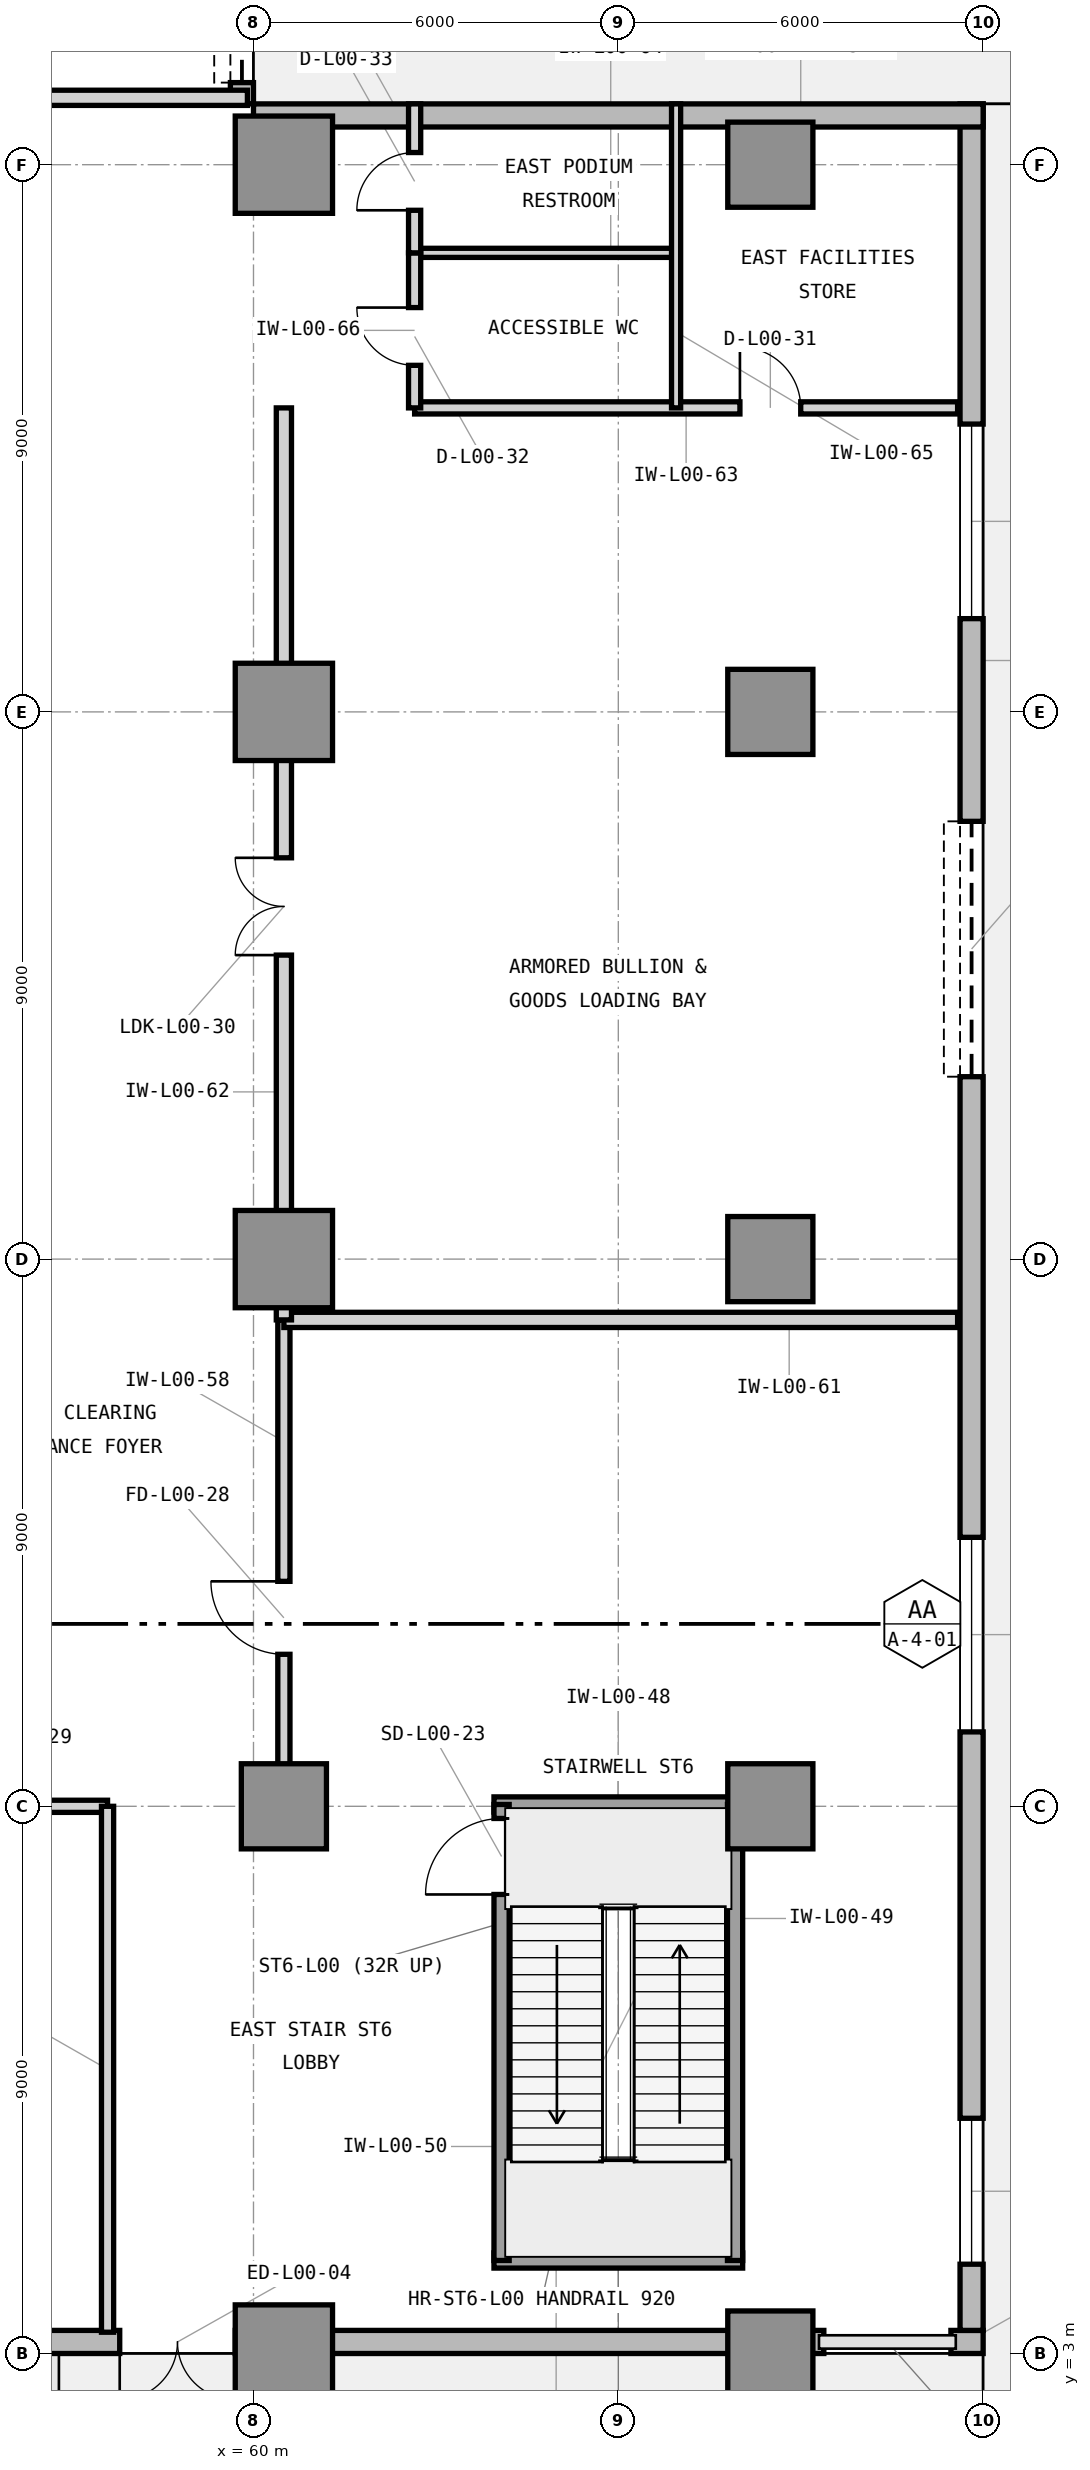
"""IFC4 building model, lengths in metres.
Left out: names, types, materials, properties, quantities, classifications, styles, units other than length and angle.
Written with IfcOpenShell. Run it as: python <this file> out.ifc"""

import sys

from ifc_helpers import new_model, si_unit, direction, frame, frame_2d, origin, origin_2d, place, context, subcontext, project, spatial, rectangle, extrude, element, fill, save


model = new_model("IFC4")
c1 = context("Model", 3, precision=1e-05, world=origin(), true_north=direction((0.0, 1.0)))
c2 = subcontext(c1, "Body", "Model", "MODEL_VIEW")
j1 = project(units=[si_unit("LENGTHUNIT", "METRE"), si_unit("PLANEANGLEUNIT", "RADIAN")], contexts=[c1])
p1 = place(None, origin())
s1 = spatial("IfcSite", under=j1, at=p1, CompositionType="ELEMENT")
p2 = place(p1, origin())
s2 = spatial("IfcBuilding", under=s1, at=p2, CompositionType="ELEMENT")
p3 = place(p2, origin())
s3 = spatial("IfcBuildingStorey", under=s2, at=p3, CompositionType="ELEMENT", Elevation=0.0)
p4 = place(p3, frame((60.5, 3.0, 0.0), z_axis=(0.0, 0.0, 1.0), x_axis=(1.0, 0.0, 0.0)))
e1 = element("IfcColumn", 1, at=p4, inside=s3, PredefinedType="COLUMN", context=c2, shape_type="SweptSolid", body=[
    extrude(rectangle(XDim=1.6, YDim=1.6, at=origin_2d()), origin(), (0.0, 0.0, 1.0), 5.4),
])
p5 = place(p3, frame((60.5, 12.0, 0.0), z_axis=(0.0, 0.0, 1.0), x_axis=(1.0, 0.0, 0.0)))
e2 = element("IfcColumn", 2, at=p5, inside=s3, PredefinedType="COLUMN", context=c2, shape_type="SweptSolid", body=[
    extrude(rectangle(XDim=1.4, YDim=1.4, at=origin_2d()), origin(), (0.0, 0.0, 1.0), 5.4),
])
for number, where, z_axis, x_axis in (
    (3, (60.5, 21.0, 0.0), (0.0, 0.0, 1.0), (1.0, 0.0, 0.0)),
    (4, (60.5, 30.0, 0.0), (0.0, 0.0, 1.0), (1.0, 0.0, 0.0)),
    (5, (60.5, 39.0, 0.0), (0.0, 0.0, 1.0), (1.0, 0.0, 0.0)),
):
    element("IfcColumn", number, at=place(p3, frame(where, z_axis=z_axis, x_axis=x_axis)), inside=s3, PredefinedType="COLUMN", context=c2, shape_type="SweptSolid", body=[
        extrude(rectangle(XDim=1.6, YDim=1.6, at=origin_2d()), origin(), (0.0, 0.0, 1.0), 5.4),
    ])
for number, where, z_axis, x_axis in (
    (6, (68.5, 3.0, 0.0), (0.0, 0.0, 1.0), (1.0, 0.0, 0.0)),
    (7, (68.5, 12.0, 0.0), (0.0, 0.0, 1.0), (1.0, 0.0, 0.0)),
    (8, (68.5, 21.0, 0.0), (0.0, 0.0, 1.0), (1.0, 0.0, 0.0)),
    (9, (68.5, 30.0, 0.0), (0.0, 0.0, 1.0), (1.0, 0.0, 0.0)),
    (10, (68.5, 39.0, 0.0), (0.0, 0.0, 1.0), (1.0, 0.0, 0.0)),
):
    element("IfcColumn", number, at=place(p3, frame(where, z_axis=z_axis, x_axis=x_axis)), inside=s3, PredefinedType="COLUMN", context=c2, shape_type="SweptSolid", body=[
        extrude(rectangle(XDim=1.4, YDim=1.4, at=origin_2d()), origin(), (0.0, 0.0, 1.0), 5.4),
    ])
p6 = place(p3, frame((51.0, 3.19, 0.0), z_axis=(0.0, 0.0, 1.0), x_axis=(1.0, 0.0, 0.0)))
e11 = element("IfcWall", 11, at=p6, inside=s3, PredefinedType="STANDARD", context=c2, shape_type="SweptSolid", body=[
    extrude(rectangle(XDim=18.38, YDim=0.38, at=frame_2d((9.19, 0.0))), origin(), (0.0, 0.0, 1.0), 4.234),
])
p7 = place(p6, frame((6.8, 0.0, 0.0)))
e12 = element("IfcOpeningElement", 12, at=p7, cuts=e11, PredefinedType="OPENING", context=c2, shape_type="SweptSolid", body=[
    extrude(rectangle(XDim=1.9, YDim=2.4, at=frame_2d((0.95, 1.2))), frame((0.0, 0.2, 0.0), z_axis=(0.0, -1.0, 0.0), x_axis=(1.0, 0.0, 0.0)), (0.0, 0.0, 1.0), 0.4),
])
p8 = place(p3, frame((71.47, 3.19, 0.0), z_axis=(0.0, 0.0, 1.0), x_axis=(1.0, 0.0, 0.0)))
e13 = element("IfcWall", 13, at=p8, inside=s3, PredefinedType="STANDARD", context=c2, shape_type="SweptSolid", body=[
    extrude(rectangle(XDim=0.53, YDim=0.38, at=frame_2d((0.265, 0.0))), origin(), (0.0, 0.0, 1.0), 5.1),
])
p9 = place(p3, frame((71.81, 3.38, 0.0), z_axis=(0.0, 0.0, 1.0), x_axis=(0.0, 1.0, 0.0)))
e14 = element("IfcWall", 14, at=p9, inside=s3, PredefinedType="STANDARD", context=c2, shape_type="SweptSolid", body=[
    extrude(rectangle(XDim=36.62, YDim=0.38, at=frame_2d((18.31, 0.0))), origin(), (0.0, 0.0, 1.0), 5.1),
])
p10 = place(p9, frame((20.62, 0.0, 0.0)))
e15 = element("IfcOpeningElement", 15, at=p10, cuts=e14, PredefinedType="OPENING", context=c2, shape_type="SweptSolid", body=[
    extrude(rectangle(XDim=4.2, YDim=3.6, at=frame_2d((2.1, 1.8))), frame((0.0, 0.2, 0.0), z_axis=(0.0, -1.0, 0.0), x_axis=(1.0, 0.0, 0.0)), (0.0, 0.0, 1.0), 0.4),
])
p11 = place(p9, frame((1.089, 0.0, 1.0)))
e16 = element("IfcOpeningElement", 16, at=p11, cuts=e14, PredefinedType="OPENING", context=c2, shape_type="SweptSolid", body=[
    extrude(rectangle(XDim=2.4, YDim=2.9, at=frame_2d((1.2, 1.45))), frame((0.0, 0.2, 0.0), z_axis=(0.0, -1.0, 0.0), x_axis=(1.0, 0.0, 0.0)), (0.0, 0.0, 1.0), 0.4),
])
p12 = place(p9, frame((9.844, 0.0, 0.9)))
e17 = element("IfcOpeningElement", 17, at=p12, cuts=e14, PredefinedType="OPENING", context=c2, shape_type="SweptSolid", body=[
    extrude(rectangle(XDim=3.2, YDim=3.1, at=frame_2d((1.6, 1.55))), frame((0.0, 0.2, 0.0), z_axis=(0.0, -1.0, 0.0), x_axis=(1.0, 0.0, 0.0)), (0.0, 0.0, 1.0), 0.4),
])
p13 = place(p9, frame((28.154, 0.0, 0.9)))
e18 = element("IfcOpeningElement", 18, at=p13, cuts=e14, PredefinedType="OPENING", context=c2, shape_type="SweptSolid", body=[
    extrude(rectangle(XDim=3.2, YDim=3.1, at=frame_2d((1.6, 1.55))), frame((0.0, 0.2, 0.0), z_axis=(0.0, -1.0, 0.0), x_axis=(1.0, 0.0, 0.0)), (0.0, 0.0, 1.0), 0.4),
])
p14 = place(p3, frame((72.0, 39.81, 0.0), z_axis=(0.0, 0.0, 1.0), x_axis=(-1.0, 0.0, 0.0)))
e19 = element("IfcWall", 19, at=p14, inside=s3, PredefinedType="STANDARD", context=c2, shape_type="SweptSolid", body=[
    extrude(rectangle(XDim=12.0, YDim=0.38, at=frame_2d((6.0, 0.0))), origin(), (0.0, 0.0, 1.0), 5.1),
])
p15 = place(p3, frame((59.81, 40.0, 0.0), z_axis=(0.0, 0.0, 1.0), x_axis=(0.0, 1.0, 0.0)))
e20 = element("IfcWall", 20, at=p15, inside=s3, PredefinedType="STANDARD", context=c2, shape_type="SweptSolid", body=[
    extrude(rectangle(XDim=11.0, YDim=0.38, at=frame_2d((5.5, 0.0))), origin(), (0.0, 0.0, 1.0), 5.1),
])
p16 = place(p15, frame((0.35, 0.0, 0.0)))
e21 = element("IfcOpeningElement", 21, at=p16, cuts=e20, PredefinedType="OPENING", context=c2, shape_type="SweptSolid", body=[
    extrude(rectangle(XDim=6.0, YDim=3.2, at=frame_2d((3.0, 1.6))), frame((0.0, 0.2, 0.0), z_axis=(0.0, -1.0, 0.0), x_axis=(1.0, 0.0, 0.0)), (0.0, 0.0, 1.0), 0.4),
])
for number, where, z_axis, x_axis in (
    (22, (63.955, 4.53, 0.0), (0.0, 0.0, 1.0), (1.0, 0.0, 0.0)),
    (23, (63.955, 12.03, 0.0), (0.0, 0.0, 1.0), (1.0, 0.0, 0.0)),
):
    element("IfcWall", number, at=place(p3, frame(where, z_axis=z_axis, x_axis=x_axis)), inside=s3, PredefinedType="SHEAR", context=c2, shape_type="SweptSolid", body=[
        extrude(rectangle(XDim=4.09, YDim=0.25, at=frame_2d((2.045, 0.0))), origin(), (0.0, 0.0, 1.0), 5.4),
    ])
p17 = place(p3, frame((67.92, 4.53, 0.0), z_axis=(0.0, 0.0, 1.0), x_axis=(0.0, 1.0, 0.0)))
e24 = element("IfcWall", 24, at=p17, inside=s3, PredefinedType="SHEAR", context=c2, shape_type="SweptSolid", body=[
    extrude(rectangle(XDim=7.5, YDim=0.25, at=frame_2d((3.75, 0.0))), origin(), (0.0, 0.0, 1.0), 5.4),
])
p18 = place(p3, frame((64.08, 4.53, 0.0), z_axis=(0.0, 0.0, 1.0), x_axis=(0.0, 1.0, 0.0)))
e25 = element("IfcWall", 25, at=p18, inside=s3, PredefinedType="SHEAR", context=c2, shape_type="SweptSolid", body=[
    extrude(rectangle(XDim=7.5, YDim=0.25, at=frame_2d((3.75, 0.0))), origin(), (0.0, 0.0, 1.0), 5.4),
])
p19 = place(p18, frame((6.02, 0.0, 0.0)))
e26 = element("IfcOpeningElement", 26, at=p19, cuts=e25, PredefinedType="OPENING", context=c2, shape_type="SweptSolid", body=[
    extrude(rectangle(XDim=1.25, YDim=2.2, at=frame_2d((0.625, 1.1))), frame((0.0, 0.135, 0.0), z_axis=(0.0, -1.0, 0.0), x_axis=(1.0, 0.0, 0.0)), (0.0, 0.0, 1.0), 0.27),
])
p20 = place(p3, frame((60.5, 12.0, 0.0), z_axis=(0.0, 0.0, 1.0), x_axis=(0.0, 1.0, 0.0)))
e27 = element("IfcWall", 27, at=p20, inside=s3, PredefinedType="PARTITIONING", context=c2, shape_type="SweptSolid", body=[
    extrude(rectangle(XDim=8.0, YDim=0.2, at=frame_2d((4.0, 0.0))), origin(), (0.0, 0.0, 1.0), 4.234),
])
p21 = place(p20, frame((2.5, 0.0, 0.0)))
e28 = element("IfcOpeningElement", 28, at=p21, cuts=e27, PredefinedType="OPENING", context=c2, shape_type="SweptSolid", body=[
    extrude(rectangle(XDim=1.2, YDim=2.2, at=frame_2d((0.6, 1.1))), frame((0.0, 0.11, 0.0), z_axis=(0.0, -1.0, 0.0), x_axis=(1.0, 0.0, 0.0)), (0.0, 0.0, 1.0), 0.22),
])
p22 = place(p3, frame((51.15, 12.0, 0.0), z_axis=(0.0, 0.0, 1.0), x_axis=(1.0, 0.0, 0.0)))
e29 = element("IfcWall", 29, at=p22, inside=s3, PredefinedType="PARTITIONING", context=c2, shape_type="SweptSolid", body=[
    extrude(rectangle(XDim=6.45, YDim=0.2, at=frame_2d((3.225, 0.0))), origin(), (0.0, 0.0, 1.0), 4.234),
])
p23 = place(p22, frame((2.1, 0.0, 0.0)))
e30 = element("IfcOpeningElement", 30, at=p23, cuts=e29, PredefinedType="OPENING", context=c2, shape_type="SweptSolid", body=[
    extrude(rectangle(XDim=2.0, YDim=2.5, at=frame_2d((1.0, 1.25))), frame((0.0, 0.11, 0.0), z_axis=(0.0, -1.0, 0.0), x_axis=(1.0, 0.0, 0.0)), (0.0, 0.0, 1.0), 0.22),
])
p24 = place(p3, frame((57.6, 3.35, 0.0), z_axis=(0.0, 0.0, 1.0), x_axis=(0.0, 1.0, 0.0)))
e31 = element("IfcWall", 31, at=p24, inside=s3, PredefinedType="PARTITIONING", context=c2, shape_type="SweptSolid", body=[
    extrude(rectangle(XDim=8.65, YDim=0.2, at=frame_2d((4.325, 0.0))), origin(), (0.0, 0.0, 1.0), 5.09),
])
p25 = place(p3, frame((60.5, 20.0, 0.0), z_axis=(0.0, 0.0, 1.0), x_axis=(1.0, 0.0, 0.0)))
e32 = element("IfcWall", 32, at=p25, inside=s3, PredefinedType="PARTITIONING", context=c2, shape_type="SweptSolid", body=[
    extrude(rectangle(XDim=11.08, YDim=0.25, at=frame_2d((5.54, 0.0))), origin(), (0.0, 0.0, 1.0), 5.09),
])
p26 = place(p3, frame((60.5, 20.0, 0.0), z_axis=(0.0, 0.0, 1.0), x_axis=(0.0, 1.0, 0.0)))
e33 = element("IfcWall", 33, at=p26, inside=s3, PredefinedType="PARTITIONING", context=c2, shape_type="SweptSolid", body=[
    extrude(rectangle(XDim=15.0, YDim=0.25, at=frame_2d((7.5, 0.0))), origin(), (0.0, 0.0, 1.0), 4.234),
])
p27 = place(p26, frame((6.0, 0.0, 0.0)))
e34 = element("IfcOpeningElement", 34, at=p27, cuts=e33, PredefinedType="OPENING", context=c2, shape_type="SweptSolid", body=[
    extrude(rectangle(XDim=1.6, YDim=2.3, at=frame_2d((0.8, 1.15))), frame((0.0, 0.135, 0.0), z_axis=(0.0, -1.0, 0.0), x_axis=(1.0, 0.0, 0.0)), (0.0, 0.0, 1.0), 0.27),
])
p28 = place(p3, frame((62.65, 35.0, 0.0), z_axis=(0.0, 0.0, 1.0), x_axis=(1.0, 0.0, 0.0)))
e35 = element("IfcWall", 35, at=p28, inside=s3, PredefinedType="PARTITIONING", context=c2, shape_type="SweptSolid", body=[
    extrude(rectangle(XDim=8.93, YDim=0.2, at=frame_2d((4.465, 0.0))), origin(), (0.0, 0.0, 1.0), 5.09),
])
p29 = place(p28, frame((5.35, 0.0, 0.0)))
e36 = element("IfcOpeningElement", 36, at=p29, cuts=e35, PredefinedType="OPENING", context=c2, shape_type="SweptSolid", body=[
    extrude(rectangle(XDim=1.0, YDim=2.15, at=frame_2d((0.5, 1.075))), frame((0.0, 0.11, 0.0), z_axis=(0.0, -1.0, 0.0), x_axis=(1.0, 0.0, 0.0)), (0.0, 0.0, 1.0), 0.22),
])
p30 = place(p3, frame((62.65, 37.55, 0.0), z_axis=(0.0, 0.0, 1.0), x_axis=(1.0, 0.0, 0.0)))
e37 = element("IfcWall", 37, at=p30, inside=s3, PredefinedType="PARTITIONING", context=c2, shape_type="SweptSolid", body=[
    extrude(rectangle(XDim=4.3, YDim=0.15, at=frame_2d((2.15, 0.0))), origin(), (0.0, 0.0, 1.0), 5.09),
])
p31 = place(p3, frame((66.95, 35.0, 0.0), z_axis=(0.0, 0.0, 1.0), x_axis=(0.0, 1.0, 0.0)))
e38 = element("IfcWall", 38, at=p31, inside=s3, PredefinedType="PARTITIONING", context=c2, shape_type="SweptSolid", body=[
    extrude(rectangle(XDim=5.0, YDim=0.15, at=frame_2d((2.5, 0.0))), origin(), (0.0, 0.0, 1.0), 5.09),
])
p32 = place(p3, frame((62.65, 35.0, 0.0), z_axis=(0.0, 0.0, 1.0), x_axis=(0.0, 1.0, 0.0)))
e39 = element("IfcWall", 39, at=p32, inside=s3, PredefinedType="PARTITIONING", context=c2, shape_type="SweptSolid", body=[
    extrude(rectangle(XDim=2.55, YDim=0.2, at=frame_2d((1.275, 0.0))), origin(), (0.0, 0.0, 1.0), 5.09),
])
p33 = place(p32, frame((0.7, 0.0, 0.0)))
e40 = element("IfcOpeningElement", 40, at=p33, cuts=e39, PredefinedType="OPENING", context=c2, shape_type="SweptSolid", body=[
    extrude(rectangle(XDim=0.95, YDim=2.1, at=frame_2d((0.475, 1.05))), frame((0.0, 0.11, 0.0), z_axis=(0.0, -1.0, 0.0), x_axis=(1.0, 0.0, 0.0)), (0.0, 0.0, 1.0), 0.22),
])
p34 = place(p3, frame((62.65, 37.55, 0.0), z_axis=(0.0, 0.0, 1.0), x_axis=(0.0, 1.0, 0.0)))
e41 = element("IfcWall", 41, at=p34, inside=s3, PredefinedType="PARTITIONING", context=c2, shape_type="SweptSolid", body=[
    extrude(rectangle(XDim=2.45, YDim=0.2, at=frame_2d((1.225, 0.0))), origin(), (0.0, 0.0, 1.0), 5.09),
])
p35 = place(p34, frame((0.7, 0.0, 0.0)))
e42 = element("IfcOpeningElement", 42, at=p35, cuts=e41, PredefinedType="OPENING", context=c2, shape_type="SweptSolid", body=[
    extrude(rectangle(XDim=0.95, YDim=2.1, at=frame_2d((0.475, 1.05))), frame((0.0, 0.11, 0.0), z_axis=(0.0, -1.0, 0.0), x_axis=(1.0, 0.0, 0.0)), (0.0, 0.0, 1.0), 0.22),
])
p36 = place(p3, frame((28.65, 40.1, 0.0), z_axis=(0.0, 0.0, 1.0), x_axis=(1.0, 0.0, 0.0)))
e43 = element("IfcWall", 43, at=p36, inside=s3, PredefinedType="PARTITIONING", context=c2, shape_type="SweptSolid", body=[
    extrude(rectangle(XDim=31.25, YDim=0.25, at=frame_2d((15.625, 0.0))), origin(), (0.0, 0.0, 1.0), 5.09),
])
p37 = place(p36, frame((6.0, 0.0, 0.0)))
e44 = element("IfcOpeningElement", 44, at=p37, cuts=e43, PredefinedType="OPENING", context=c2, shape_type="SweptSolid", body=[
    extrude(rectangle(XDim=1.2, YDim=2.2, at=frame_2d((0.6, 1.1))), frame((0.0, 0.135, 0.0), z_axis=(0.0, -1.0, 0.0), x_axis=(1.0, 0.0, 0.0)), (0.0, 0.0, 1.0), 0.27),
])
p38 = place(p7, frame((1.9, 0.0, 0.0), z_axis=(0.0, 0.0, 1.0), x_axis=(-1.0, 0.0, 0.0)))
e45 = element("IfcDoor", 45, at=p38, inside=s3, OperationType="DOUBLE_DOOR_SINGLE_SWING", PredefinedType="DOOR", context=c2, shape_type="SweptSolid", body=[
    extrude(rectangle(XDim=1.9, YDim=2.4, at=frame_2d((0.95, 1.2))), frame((0.0, 0.025, 0.0), z_axis=(0.0, -1.0, 0.0), x_axis=(1.0, 0.0, 0.0)), (0.0, 0.0, 1.0), 0.05),
])
fill(e12, e45)
p39 = place(p10, frame((4.2, 0.0, 0.0), z_axis=(0.0, 0.0, 1.0), x_axis=(-1.0, 0.0, 0.0)))
e46 = element("IfcDoor", 46, at=p39, inside=s3, OperationType="ROLLINGUP", PredefinedType="DOOR", context=c2, shape_type="SweptSolid", body=[
    extrude(rectangle(XDim=4.2, YDim=3.6, at=frame_2d((2.1, 1.8))), frame((0.0, 0.025, 0.0), z_axis=(0.0, -1.0, 0.0), x_axis=(1.0, 0.0, 0.0)), (0.0, 0.0, 1.0), 0.05),
])
fill(e15, e46)
p40 = place(p11, origin())
e47 = element("IfcWindow", 47, at=p40, inside=s3, PartitioningType="SINGLE_PANEL", PredefinedType="WINDOW", context=c2, shape_type="SweptSolid", body=[
    extrude(rectangle(XDim=2.4, YDim=2.9, at=frame_2d((1.2, 1.45))), frame((0.0, 0.11, 0.0), z_axis=(0.0, -1.0, 0.0), x_axis=(1.0, 0.0, 0.0)), (0.0, 0.0, 1.0), 0.06),
])
fill(e16, e47)
p41 = place(p12, origin())
e48 = element("IfcWindow", 48, at=p41, inside=s3, PartitioningType="SINGLE_PANEL", PredefinedType="WINDOW", context=c2, shape_type="SweptSolid", body=[
    extrude(rectangle(XDim=3.2, YDim=3.1, at=frame_2d((1.6, 1.55))), frame((0.0, 0.11, 0.0), z_axis=(0.0, -1.0, 0.0), x_axis=(1.0, 0.0, 0.0)), (0.0, 0.0, 1.0), 0.06),
])
fill(e17, e48)
p42 = place(p13, origin())
e49 = element("IfcWindow", 49, at=p42, inside=s3, PartitioningType="SINGLE_PANEL", PredefinedType="WINDOW", context=c2, shape_type="SweptSolid", body=[
    extrude(rectangle(XDim=3.2, YDim=3.1, at=frame_2d((1.6, 1.55))), frame((0.0, 0.11, 0.0), z_axis=(0.0, -1.0, 0.0), x_axis=(1.0, 0.0, 0.0)), (0.0, 0.0, 1.0), 0.06),
])
fill(e18, e49)
p43 = place(p16, frame((6.0, 0.0, 0.0), z_axis=(0.0, 0.0, 1.0), x_axis=(-1.0, 0.0, 0.0)))
e50 = element("IfcDoor", 50, at=p43, inside=s3, OperationType="ROLLINGUP", PredefinedType="DOOR", context=c2, shape_type="SweptSolid", body=[
    extrude(rectangle(XDim=6.0, YDim=3.2, at=frame_2d((3.0, 1.6))), frame((0.0, 0.025, 0.0), z_axis=(0.0, -1.0, 0.0), x_axis=(1.0, 0.0, 0.0)), (0.0, 0.0, 1.0), 0.05),
])
fill(e21, e50)
p44 = place(p19, origin())
e51 = element("IfcDoor", 51, at=p44, inside=s3, OperationType="SINGLE_SWING_LEFT", PredefinedType="DOOR", context=c2, shape_type="SweptSolid", body=[
    extrude(rectangle(XDim=1.25, YDim=2.2, at=frame_2d((0.625, 1.1))), frame((0.0, 0.025, 0.0), z_axis=(0.0, -1.0, 0.0), x_axis=(1.0, 0.0, 0.0)), (0.0, 0.0, 1.0), 0.05),
])
fill(e26, e51)
p45 = place(p21, origin())
e52 = element("IfcDoor", 52, at=p45, inside=s3, OperationType="SINGLE_SWING_RIGHT", PredefinedType="DOOR", context=c2, shape_type="SweptSolid", body=[
    extrude(rectangle(XDim=1.2, YDim=2.2, at=frame_2d((0.6, 1.1))), frame((0.0, 0.025, 0.0), z_axis=(0.0, -1.0, 0.0), x_axis=(1.0, 0.0, 0.0)), (0.0, 0.0, 1.0), 0.05),
])
fill(e28, e52)
p46 = place(p27, origin())
e53 = element("IfcDoor", 53, at=p46, inside=s3, OperationType="DOUBLE_DOOR_SINGLE_SWING", PredefinedType="DOOR", context=c2, shape_type="SweptSolid", body=[
    extrude(rectangle(XDim=1.6, YDim=2.3, at=frame_2d((0.8, 1.15))), frame((0.0, 0.025, 0.0), z_axis=(0.0, -1.0, 0.0), x_axis=(1.0, 0.0, 0.0)), (0.0, 0.0, 1.0), 0.05),
])
fill(e34, e53)
p47 = place(p29, origin())
e54 = element("IfcDoor", 54, at=p47, inside=s3, OperationType="SINGLE_SWING_LEFT", PredefinedType="DOOR", context=c2, shape_type="SweptSolid", body=[
    extrude(rectangle(XDim=1.0, YDim=2.15, at=frame_2d((0.5, 1.075))), frame((0.0, 0.025, 0.0), z_axis=(0.0, -1.0, 0.0), x_axis=(1.0, 0.0, 0.0)), (0.0, 0.0, 1.0), 0.05),
])
fill(e36, e54)
p48 = place(p33, origin())
e55 = element("IfcDoor", 55, at=p48, inside=s3, OperationType="SINGLE_SWING_RIGHT", PredefinedType="DOOR", context=c2, shape_type="SweptSolid", body=[
    extrude(rectangle(XDim=0.95, YDim=2.1, at=frame_2d((0.475, 1.05))), frame((0.0, 0.025, 0.0), z_axis=(0.0, -1.0, 0.0), x_axis=(1.0, 0.0, 0.0)), (0.0, 0.0, 1.0), 0.05),
])
fill(e40, e55)
p49 = place(p35, origin())
e56 = element("IfcDoor", 56, at=p49, inside=s3, OperationType="SINGLE_SWING_LEFT", PredefinedType="DOOR", context=c2, shape_type="SweptSolid", body=[
    extrude(rectangle(XDim=0.95, YDim=2.1, at=frame_2d((0.475, 1.05))), frame((0.0, 0.025, 0.0), z_axis=(0.0, -1.0, 0.0), x_axis=(1.0, 0.0, 0.0)), (0.0, 0.0, 1.0), 0.05),
])
fill(e42, e56)
save(model, sys.argv[1])
